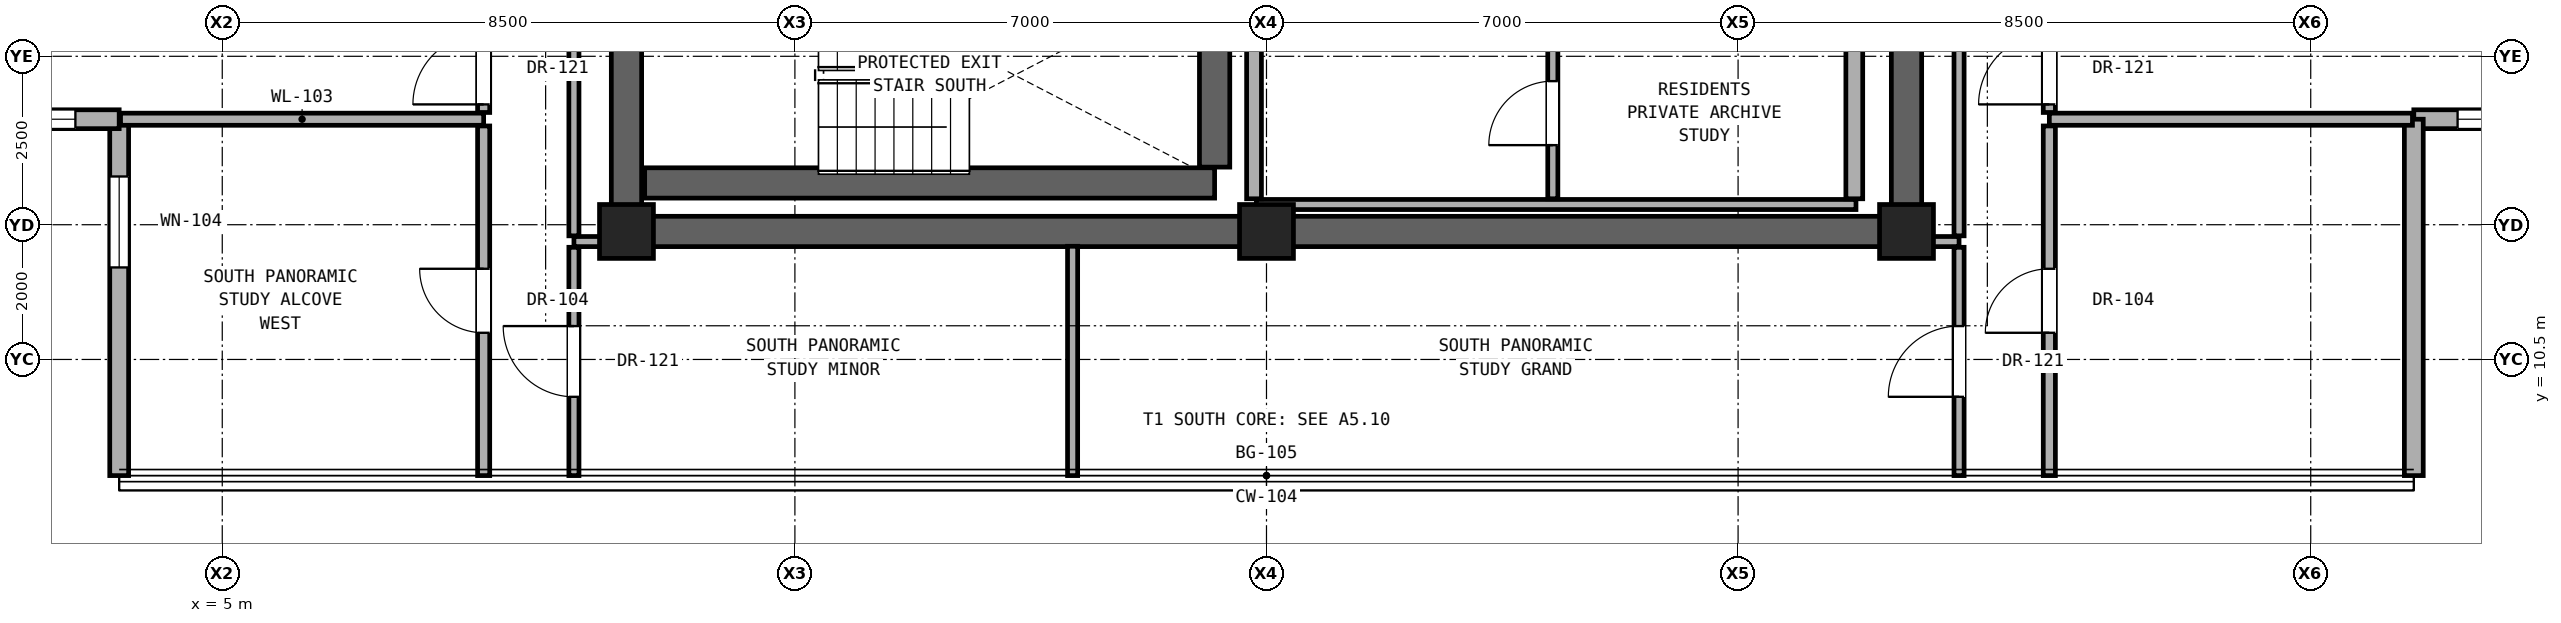
"""IFC4 building model, lengths in metres.
Left out: names, types, materials, properties, quantities, classifications, styles, units other than length and angle.
Written with IfcOpenShell. Run it as: python <this file> out.ifc"""

import sys

from ifc_helpers import new_model, si_unit, direction, frame, frame_2d, origin, origin_2d, place, context, subcontext, project, spatial, rectangle, extrude, element, fill, save


model = new_model("IFC4")
c1 = context("Model", 3, precision=1e-05, world=origin(), true_north=direction((0.0, 1.0)))
c2 = subcontext(c1, "Body", "Model", "MODEL_VIEW")
j1 = project(units=[si_unit("LENGTHUNIT", "METRE"), si_unit("PLANEANGLEUNIT", "RADIAN")], contexts=[c1])
p1 = place(None, origin())
s1 = spatial("IfcSite", under=j1, at=p1, CompositionType="ELEMENT")
p2 = place(p1, origin())
s2 = spatial("IfcBuilding", under=s1, at=p2, CompositionType="ELEMENT")
p3 = place(p2, frame((0.0, 0.0, 245.8)))
s3 = spatial("IfcBuildingStorey", under=s2, at=p3, CompositionType="ELEMENT", Elevation=245.8)
for number, where, z_axis, x_axis in (
    (1, (11.0, 12.4, 0.0), (0.0, 0.0, 1.0), (1.0, 0.0, 0.0)),
    (2, (20.5, 12.4, 0.0), (0.0, 0.0, 1.0), (1.0, 0.0, 0.0)),
    (3, (30.0, 12.4, 0.0), (0.0, 0.0, 1.0), (1.0, 0.0, 0.0)),
):
    element("IfcColumn", number, at=place(p3, frame(where, z_axis=z_axis, x_axis=x_axis)), inside=s3, PredefinedType="COLUMN", context=c2, shape_type="SweptSolid", body=[
        extrude(rectangle(XDim=0.8, YDim=0.8, at=origin_2d()), origin(), (0.0, 0.0, 1.0), 3.3),
    ])
p4 = place(p3, frame((11.0, 12.4, 0.0), z_axis=(0.0, 0.0, 1.0), x_axis=(1.0, 0.0, 0.0)))
e4 = element("IfcWall", 4, at=p4, inside=s3, PredefinedType="SHEAR", context=c2, shape_type="SweptSolid", body=[
    extrude(rectangle(XDim=19.0, YDim=0.45, at=frame_2d((9.5, 0.0))), origin(), (0.0, 0.0, 1.0), 3.1),
])
for number, where, z_axis, x_axis in (
    (5, (11.0, 12.4, 0.0), (0.0, 0.0, 1.0), (0.0, 1.0, 0.0)),
    (6, (30.0, 12.4, 0.0), (0.0, 0.0, 1.0), (0.0, 1.0, 0.0)),
):
    element("IfcWall", number, at=place(p3, frame(where, z_axis=z_axis, x_axis=x_axis)), inside=s3, PredefinedType="SHEAR", context=c2, shape_type="SweptSolid", body=[
        extrude(rectangle(XDim=6.0, YDim=0.45, at=frame_2d((3.0, 0.0))), origin(), (0.0, 0.0, 1.0), 3.1),
    ])
p5 = place(p3, frame((3.47, 14.066, 0.0), z_axis=(0.0, 0.0, 1.0), x_axis=(0.0, -1.0, 0.0)))
e7 = element("IfcWall", 7, at=p5, inside=s3, PredefinedType="SOLIDWALL", context=c2, shape_type="SweptSolid", body=[
    extrude(rectangle(XDim=5.29, YDim=0.28, at=frame_2d((2.645, 0.0))), origin(), (0.0, 0.0, 1.0), 3.08),
])
p6 = place(p5, frame((0.85, 0.0, 0.73)))
e8 = element("IfcOpeningElement", 8, at=p6, cuts=e7, PredefinedType="OPENING", context=c2, shape_type="SweptSolid", body=[
    extrude(rectangle(XDim=1.35, YDim=2.2, at=frame_2d((0.675, 1.1))), frame((0.0, 0.15, 0.0), z_axis=(0.0, -1.0, 0.0), x_axis=(1.0, 0.0, 0.0)), (0.0, 0.0, 1.0), 0.3),
])
p7 = place(p3, frame((-1.82, 14.066, 0.0), z_axis=(0.0, 0.0, 1.0), x_axis=(1.0, 0.0, 0.0)))
e9 = element("IfcWall", 9, at=p7, inside=s3, PredefinedType="SOLIDWALL", context=c2, shape_type="SweptSolid", body=[
    extrude(rectangle(XDim=5.29, YDim=0.28, at=frame_2d((2.645, 0.0))), origin(), (0.0, 0.0, 1.0), 3.08),
])
p8 = place(p7, frame((3.54, 0.0, 0.85)))
e10 = element("IfcOpeningElement", 10, at=p8, cuts=e9, PredefinedType="OPENING", context=c2, shape_type="SweptSolid", body=[
    extrude(rectangle(XDim=1.1, YDim=2.0, at=frame_2d((0.55, 1.0))), frame((0.0, 0.15, 0.0), z_axis=(0.0, -1.0, 0.0), x_axis=(1.0, 0.0, 0.0)), (0.0, 0.0, 1.0), 0.3),
])
p9 = place(p3, frame((37.53, 14.066, 0.0), z_axis=(0.0, 0.0, 1.0), x_axis=(1.0, 0.0, 0.0)))
e11 = element("IfcWall", 11, at=p9, inside=s3, PredefinedType="SOLIDWALL", context=c2, shape_type="SweptSolid", body=[
    extrude(rectangle(XDim=5.29, YDim=0.28, at=frame_2d((2.645, 0.0))), origin(), (0.0, 0.0, 1.0), 3.08),
])
p10 = place(p9, frame((0.65, 0.0, 0.85)))
e12 = element("IfcOpeningElement", 12, at=p10, cuts=e11, PredefinedType="OPENING", context=c2, shape_type="SweptSolid", body=[
    extrude(rectangle(XDim=1.1, YDim=2.0, at=frame_2d((0.55, 1.0))), frame((0.0, 0.15, 0.0), z_axis=(0.0, -1.0, 0.0), x_axis=(1.0, 0.0, 0.0)), (0.0, 0.0, 1.0), 0.3),
])
p11 = place(p3, frame((37.53, 8.776, 0.0), z_axis=(0.0, 0.0, 1.0), x_axis=(0.0, 1.0, 0.0)))
e13 = element("IfcWall", 13, at=p11, inside=s3, PredefinedType="SOLIDWALL", context=c2, shape_type="SweptSolid", body=[
    extrude(rectangle(XDim=5.29, YDim=0.28, at=frame_2d((2.645, 0.0))), origin(), (0.0, 0.0, 1.0), 3.08),
])
for number, where, z_axis, x_axis in (
    (14, (10.22, 12.25, 0.0), (0.0, 0.0, 1.0), (1.0, 0.0, 0.0)),
    (15, (30.22, 12.25, 0.0), (0.0, 0.0, 1.0), (1.0, 0.0, 0.0)),
):
    element("IfcWall", number, at=place(p3, frame(where, z_axis=z_axis, x_axis=x_axis)), inside=s3, PredefinedType="PARTITIONING", context=c2, shape_type="SweptSolid", body=[
        extrude(rectangle(XDim=0.56, YDim=0.15, at=frame_2d((0.28, 0.0))), origin(), (0.0, 0.0, 1.0), 3.1),
    ])
p12 = place(p3, frame((20.35, 12.8, 0.0), z_axis=(0.0, 0.0, 1.0), x_axis=(1.0, 0.0, 0.0)))
e16 = element("IfcWall", 16, at=p12, inside=s3, PredefinedType="PARTITIONING", context=c2, shape_type="SweptSolid", body=[
    extrude(rectangle(XDim=8.9, YDim=0.15, at=frame_2d((4.45, 0.0))), origin(), (0.0, 0.0, 1.0), 3.1),
])
p13 = place(p3, frame((11.27, 13.12, 0.0), z_axis=(0.0, 0.0, 1.0), x_axis=(1.0, 0.0, 0.0)))
e17 = element("IfcWall", 17, at=p13, inside=s3, PredefinedType="SHEAR", context=c2, shape_type="SweptSolid", body=[
    extrude(rectangle(XDim=8.46, YDim=0.45, at=frame_2d((4.23, 0.0))), origin(), (0.0, 0.0, 1.0), 3.1),
])
for number, where, z_axis, x_axis in (
    (18, (3.49, 14.066, 0.0), (0.0, 0.0, 1.0), (1.0, 0.0, 0.0)),
    (19, (32.12, 14.066, 0.0), (0.0, 0.0, 1.0), (1.0, 0.0, 0.0)),
):
    element("IfcWall", number, at=place(p3, frame(where, z_axis=z_axis, x_axis=x_axis)), inside=s3, PredefinedType="PARTITIONING", context=c2, shape_type="SweptSolid", body=[
        extrude(rectangle(XDim=5.39, YDim=0.18, at=frame_2d((2.695, 0.0))), origin(), (0.0, 0.0, 1.0), 3.1),
    ])
p14 = place(p3, frame((8.88, 8.776, 0.0), z_axis=(0.0, 0.0, 1.0), x_axis=(0.0, 1.0, 0.0)))
e20 = element("IfcWall", 20, at=p14, inside=s3, PredefinedType="PARTITIONING", context=c2, shape_type="SweptSolid", body=[
    extrude(rectangle(XDim=5.19, YDim=0.18, at=frame_2d((2.595, 0.0))), origin(), (0.0, 0.0, 1.0), 3.1),
])
p15 = place(p14, frame((2.12, 0.0, 0.0)))
e21 = element("IfcOpeningElement", 21, at=p15, cuts=e20, PredefinedType="OPENING", context=c2, shape_type="SweptSolid", body=[
    extrude(rectangle(XDim=0.95, YDim=2.15, at=frame_2d((0.475, 1.075))), frame((0.0, 0.1, 0.0), z_axis=(0.0, -1.0, 0.0), x_axis=(1.0, 0.0, 0.0)), (0.0, 0.0, 1.0), 0.2),
])
p16 = place(p3, frame((8.88, 14.166, 0.0), z_axis=(0.0, 0.0, 1.0), x_axis=(0.0, 1.0, 0.0)))
e22 = element("IfcWall", 22, at=p16, inside=s3, PredefinedType="PARTITIONING", context=c2, shape_type="SweptSolid", body=[
    extrude(rectangle(XDim=2.214, YDim=0.18, at=frame_2d((1.107, 0.0))), origin(), (0.0, 0.0, 1.0), 3.1),
])
p17 = place(p16, frame((0.12, 0.0, 0.0)))
e23 = element("IfcOpeningElement", 23, at=p17, cuts=e22, PredefinedType="OPENING", context=c2, shape_type="SweptSolid", body=[
    extrude(rectangle(XDim=1.05, YDim=2.2, at=frame_2d((0.525, 1.1))), frame((0.0, 0.1, 0.0), z_axis=(0.0, -1.0, 0.0), x_axis=(1.0, 0.0, 0.0)), (0.0, 0.0, 1.0), 0.2),
])
p18 = place(p3, frame((10.22, 8.776, 0.0), z_axis=(0.0, 0.0, 1.0), x_axis=(0.0, 1.0, 0.0)))
e24 = element("IfcWall", 24, at=p18, inside=s3, PredefinedType="PARTITIONING", context=c2, shape_type="SweptSolid", body=[
    extrude(rectangle(XDim=3.389, YDim=0.15, at=frame_2d((1.695, 0.0))), origin(), (0.0, 0.0, 1.0), 3.1),
])
p19 = place(p18, frame((1.169, 0.0, 0.0)))
e25 = element("IfcOpeningElement", 25, at=p19, cuts=e24, PredefinedType="OPENING", context=c2, shape_type="SweptSolid", body=[
    extrude(rectangle(XDim=1.05, YDim=2.2, at=frame_2d((0.525, 1.1))), frame((0.0, 0.085, 0.0), z_axis=(0.0, -1.0, 0.0), x_axis=(1.0, 0.0, 0.0)), (0.0, 0.0, 1.0), 0.17),
])
p20 = place(p3, frame((10.22, 12.335, 0.0), z_axis=(0.0, 0.0, 1.0), x_axis=(0.0, 1.0, 0.0)))
e26 = element("IfcWall", 26, at=p20, inside=s3, PredefinedType="PARTITIONING", context=c2, shape_type="SweptSolid", body=[
    extrude(rectangle(XDim=5.98, YDim=0.15, at=frame_2d((2.99, 0.0))), origin(), (0.0, 0.0, 1.0), 2.492),
])
p21 = place(p3, frame((17.622, 8.776, 0.0), z_axis=(0.0, 0.0, 1.0), x_axis=(0.0, 1.0, 0.0)))
e27 = element("IfcWall", 27, at=p21, inside=s3, PredefinedType="PARTITIONING", context=c2, shape_type="SweptSolid", body=[
    extrude(rectangle(XDim=3.404, YDim=0.15, at=frame_2d((1.702, 0.0))), origin(), (0.0, 0.0, 1.0), 3.1),
])
p22 = place(p3, frame((19.73, 13.355, 0.0), z_axis=(0.0, 0.0, 1.0), x_axis=(0.0, 1.0, 0.0)))
e28 = element("IfcWall", 28, at=p22, inside=s3, PredefinedType="SHEAR", context=c2, shape_type="SweptSolid", body=[
    extrude(rectangle(XDim=2.73, YDim=0.45, at=frame_2d((1.365, 0.0))), origin(), (0.0, 0.0, 1.0), 3.1),
])
p23 = place(p3, frame((20.315, 12.885, 0.0), z_axis=(0.0, 0.0, 1.0), x_axis=(0.0, 1.0, 0.0)))
e29 = element("IfcWall", 29, at=p23, inside=s3, PredefinedType="SOLIDWALL", context=c2, shape_type="SweptSolid", body=[
    extrude(rectangle(XDim=3.2, YDim=0.22, at=frame_2d((1.6, 0.0))), origin(), (0.0, 0.0, 1.0), 3.1),
])
p24 = place(p3, frame((24.75, 12.885, 0.0), z_axis=(0.0, 0.0, 1.0), x_axis=(0.0, 1.0, 0.0)))
e30 = element("IfcWall", 30, at=p24, inside=s3, PredefinedType="PARTITIONING", context=c2, shape_type="SweptSolid", body=[
    extrude(rectangle(XDim=2.542, YDim=0.15, at=frame_2d((1.271, 0.0))), origin(), (0.0, 0.0, 1.0), 3.1),
])
p25 = place(p24, frame((0.796, 0.0, 0.0)))
e31 = element("IfcOpeningElement", 31, at=p25, cuts=e30, PredefinedType="OPENING", context=c2, shape_type="SweptSolid", body=[
    extrude(rectangle(XDim=0.95, YDim=2.15, at=frame_2d((0.475, 1.075))), frame((0.0, 0.085, 0.0), z_axis=(0.0, -1.0, 0.0), x_axis=(1.0, 0.0, 0.0)), (0.0, 0.0, 1.0), 0.17),
])
p26 = place(p3, frame((29.225, 12.885, 0.0), z_axis=(0.0, 0.0, 1.0), x_axis=(0.0, 1.0, 0.0)))
e32 = element("IfcWall", 32, at=p26, inside=s3, PredefinedType="SOLIDWALL", context=c2, shape_type="SweptSolid", body=[
    extrude(rectangle(XDim=2.542, YDim=0.25, at=frame_2d((1.271, 0.0))), origin(), (0.0, 0.0, 1.0), 3.1),
])
p27 = place(p3, frame((30.78, 8.776, 0.0), z_axis=(0.0, 0.0, 1.0), x_axis=(0.0, 1.0, 0.0)))
e33 = element("IfcWall", 33, at=p27, inside=s3, PredefinedType="PARTITIONING", context=c2, shape_type="SweptSolid", body=[
    extrude(rectangle(XDim=3.389, YDim=0.15, at=frame_2d((1.695, 0.0))), origin(), (0.0, 0.0, 1.0), 3.1),
])
p28 = place(p27, frame((1.169, 0.0, 0.0)))
e34 = element("IfcOpeningElement", 34, at=p28, cuts=e33, PredefinedType="OPENING", context=c2, shape_type="SweptSolid", body=[
    extrude(rectangle(XDim=1.05, YDim=2.2, at=frame_2d((0.525, 1.1))), frame((0.0, 0.085, 0.0), z_axis=(0.0, -1.0, 0.0), x_axis=(1.0, 0.0, 0.0)), (0.0, 0.0, 1.0), 0.17),
])
p29 = place(p3, frame((30.78, 12.335, 0.0), z_axis=(0.0, 0.0, 1.0), x_axis=(0.0, 1.0, 0.0)))
e35 = element("IfcWall", 35, at=p29, inside=s3, PredefinedType="PARTITIONING", context=c2, shape_type="SweptSolid", body=[
    extrude(rectangle(XDim=5.98, YDim=0.15, at=frame_2d((2.99, 0.0))), origin(), (0.0, 0.0, 1.0), 2.492),
])
p30 = place(p3, frame((32.12, 8.776, 0.0), z_axis=(0.0, 0.0, 1.0), x_axis=(0.0, 1.0, 0.0)))
e36 = element("IfcWall", 36, at=p30, inside=s3, PredefinedType="PARTITIONING", context=c2, shape_type="SweptSolid", body=[
    extrude(rectangle(XDim=5.19, YDim=0.18, at=frame_2d((2.595, 0.0))), origin(), (0.0, 0.0, 1.0), 3.1),
])
p31 = place(p30, frame((2.12, 0.0, 0.0)))
e37 = element("IfcOpeningElement", 37, at=p31, cuts=e36, PredefinedType="OPENING", context=c2, shape_type="SweptSolid", body=[
    extrude(rectangle(XDim=0.95, YDim=2.15, at=frame_2d((0.475, 1.075))), frame((0.0, 0.1, 0.0), z_axis=(0.0, -1.0, 0.0), x_axis=(1.0, 0.0, 0.0)), (0.0, 0.0, 1.0), 0.2),
])
p32 = place(p3, frame((32.12, 14.166, 0.0), z_axis=(0.0, 0.0, 1.0), x_axis=(0.0, 1.0, 0.0)))
e38 = element("IfcWall", 38, at=p32, inside=s3, PredefinedType="PARTITIONING", context=c2, shape_type="SweptSolid", body=[
    extrude(rectangle(XDim=3.414, YDim=0.18, at=frame_2d((1.707, 0.0))), origin(), (0.0, 0.0, 1.0), 2.543),
])
p33 = place(p32, frame((0.12, 0.0, 0.0)))
e39 = element("IfcOpeningElement", 39, at=p33, cuts=e38, PredefinedType="OPENING", context=c2, shape_type="SweptSolid", body=[
    extrude(rectangle(XDim=1.05, YDim=2.2, at=frame_2d((0.525, 1.1))), frame((0.0, 0.1, 0.0), z_axis=(0.0, -1.0, 0.0), x_axis=(1.0, 0.0, 0.0)), (0.0, 0.0, 1.0), 0.2),
])
p34 = place(p6, origin())
e40 = element("IfcWindow", 40, at=p34, inside=s3, PartitioningType="SINGLE_PANEL", PredefinedType="WINDOW", context=c2, shape_type="SweptSolid", body=[
    extrude(rectangle(XDim=1.35, YDim=2.2, at=frame_2d((0.675, 1.1))), frame((0.0, 0.03, 0.0), z_axis=(0.0, -1.0, 0.0), x_axis=(1.0, 0.0, 0.0)), (0.0, 0.0, 1.0), 0.06),
])
fill(e8, e40)
p35 = place(p8, origin())
e41 = element("IfcWindow", 41, at=p35, inside=s3, PartitioningType="SINGLE_PANEL", PredefinedType="WINDOW", context=c2, shape_type="SweptSolid", body=[
    extrude(rectangle(XDim=1.1, YDim=2.0, at=frame_2d((0.55, 1.0))), frame((0.0, 0.03, 0.0), z_axis=(0.0, -1.0, 0.0), x_axis=(1.0, 0.0, 0.0)), (0.0, 0.0, 1.0), 0.06),
])
fill(e10, e41)
p36 = place(p10, origin())
e42 = element("IfcWindow", 42, at=p36, inside=s3, PartitioningType="SINGLE_PANEL", PredefinedType="WINDOW", context=c2, shape_type="SweptSolid", body=[
    extrude(rectangle(XDim=1.1, YDim=2.0, at=frame_2d((0.55, 1.0))), frame((0.0, 0.03, 0.0), z_axis=(0.0, -1.0, 0.0), x_axis=(1.0, 0.0, 0.0)), (0.0, 0.0, 1.0), 0.06),
])
fill(e12, e42)
p37 = place(p25, origin())
e43 = element("IfcDoor", 43, at=p37, inside=s3, OperationType="SINGLE_SWING_LEFT", PredefinedType="DOOR", context=c2, shape_type="SweptSolid", body=[
    extrude(rectangle(XDim=0.95, YDim=2.15, at=frame_2d((0.475, 1.075))), frame((0.0, 0.025, 0.0), z_axis=(0.0, -1.0, 0.0), x_axis=(1.0, 0.0, 0.0)), (0.0, 0.0, 1.0), 0.05),
])
fill(e31, e43)
p38 = place(p17, origin())
e44 = element("IfcDoor", 44, at=p38, inside=s3, OperationType="SINGLE_SWING_LEFT", PredefinedType="DOOR", context=c2, shape_type="SweptSolid", body=[
    extrude(rectangle(XDim=1.05, YDim=2.2, at=frame_2d((0.525, 1.1))), frame((0.0, 0.025, 0.0), z_axis=(0.0, -1.0, 0.0), x_axis=(1.0, 0.0, 0.0)), (0.0, 0.0, 1.0), 0.05),
])
fill(e23, e44)
p39 = place(p33, origin())
e45 = element("IfcDoor", 45, at=p39, inside=s3, OperationType="SINGLE_SWING_LEFT", PredefinedType="DOOR", context=c2, shape_type="SweptSolid", body=[
    extrude(rectangle(XDim=1.05, YDim=2.2, at=frame_2d((0.525, 1.1))), frame((0.0, 0.025, 0.0), z_axis=(0.0, -1.0, 0.0), x_axis=(1.0, 0.0, 0.0)), (0.0, 0.0, 1.0), 0.05),
])
fill(e39, e45)
p40 = place(p19, origin())
e46 = element("IfcDoor", 46, at=p40, inside=s3, OperationType="SINGLE_SWING_RIGHT", PredefinedType="DOOR", context=c2, shape_type="SweptSolid", body=[
    extrude(rectangle(XDim=1.05, YDim=2.2, at=frame_2d((0.525, 1.1))), frame((0.0, 0.025, 0.0), z_axis=(0.0, -1.0, 0.0), x_axis=(1.0, 0.0, 0.0)), (0.0, 0.0, 1.0), 0.05),
])
fill(e25, e46)
p41 = place(p28, origin())
e47 = element("IfcDoor", 47, at=p41, inside=s3, OperationType="SINGLE_SWING_LEFT", PredefinedType="DOOR", context=c2, shape_type="SweptSolid", body=[
    extrude(rectangle(XDim=1.05, YDim=2.2, at=frame_2d((0.525, 1.1))), frame((0.0, 0.025, 0.0), z_axis=(0.0, -1.0, 0.0), x_axis=(1.0, 0.0, 0.0)), (0.0, 0.0, 1.0), 0.05),
])
fill(e34, e47)
p42 = place(p15, origin())
e48 = element("IfcDoor", 48, at=p42, inside=s3, OperationType="SINGLE_SWING_RIGHT", PredefinedType="DOOR", context=c2, shape_type="SweptSolid", body=[
    extrude(rectangle(XDim=0.95, YDim=2.15, at=frame_2d((0.475, 1.075))), frame((0.0, 0.025, 0.0), z_axis=(0.0, -1.0, 0.0), x_axis=(1.0, 0.0, 0.0)), (0.0, 0.0, 1.0), 0.05),
])
fill(e21, e48)
p43 = place(p31, origin())
e49 = element("IfcDoor", 49, at=p43, inside=s3, OperationType="SINGLE_SWING_LEFT", PredefinedType="DOOR", context=c2, shape_type="SweptSolid", body=[
    extrude(rectangle(XDim=0.95, YDim=2.15, at=frame_2d((0.475, 1.075))), frame((0.0, 0.025, 0.0), z_axis=(0.0, -1.0, 0.0), x_axis=(1.0, 0.0, 0.0)), (0.0, 0.0, 1.0), 0.05),
])
fill(e37, e49)
save(model, sys.argv[1])
